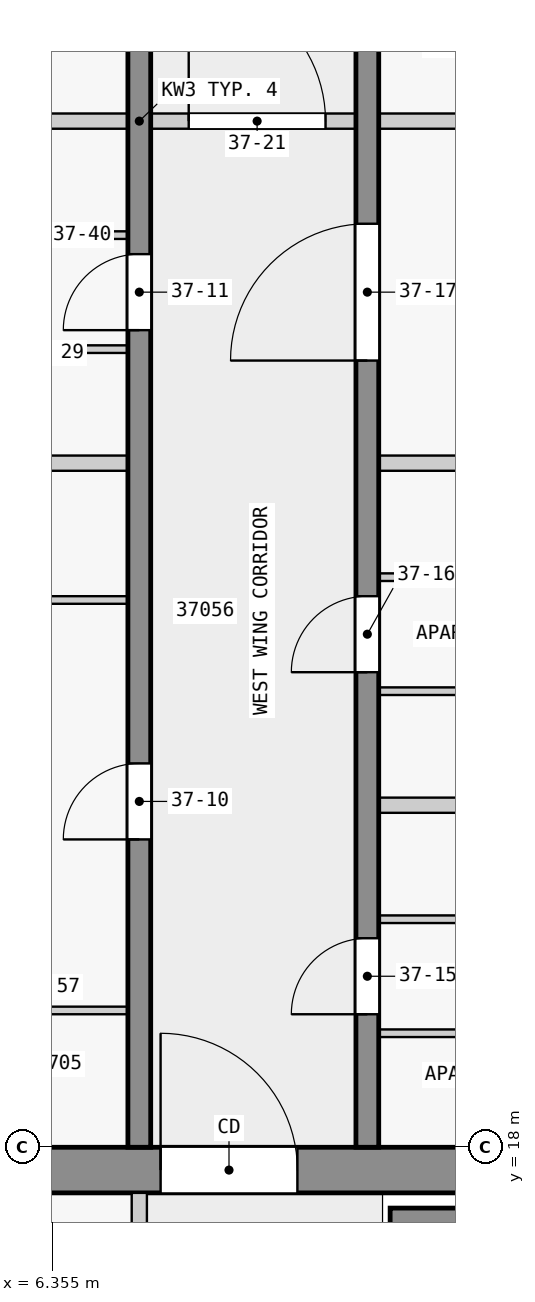
"""IFC4 building model, lengths in metres.
Left out: names, types, materials, properties, quantities, classifications, styles, units other than length and angle.
Written with IfcOpenShell. Run it as: python <this file> out.ifc"""

import sys

from ifc_helpers import new_model, si_unit, direction, frame, frame_2d, origin, place, context, subcontext, project, spatial, rectangle, extrude, element, fill, save


model = new_model("IFC4")
c1 = context("Model", 3, precision=1e-05, world=origin(), true_north=direction((0.0, 1.0)))
c2 = subcontext(c1, "Body", "Model", "MODEL_VIEW")
j1 = project(units=[si_unit("LENGTHUNIT", "METRE"), si_unit("PLANEANGLEUNIT", "RADIAN")], contexts=[c1])
p1 = place(None, origin())
s1 = spatial("IfcSite", under=j1, at=p1, CompositionType="ELEMENT")
p2 = place(p1, origin())
s2 = spatial("IfcBuilding", under=s1, at=p2, CompositionType="ELEMENT")
p3 = place(p2, frame((0.0, 0.0, 146.4)))
s3 = spatial("IfcBuildingStorey", under=s2, at=p3, CompositionType="ELEMENT", Elevation=146.4)
p4 = place(p3, frame((1.38, 17.7, 0.0), z_axis=(0.0, 0.0, 1.0), x_axis=(1.0, 0.0, 0.0)))
e1 = element("IfcWall", 1, at=p4, inside=s3, PredefinedType="SHEAR", context=c2, shape_type="SweptSolid", body=[
    extrude(rectangle(XDim=21.12, YDim=0.6, at=frame_2d((10.56, 0.0))), origin(), (0.0, 0.0, 1.0), 3.25),
])
p5 = place(p4, frame((6.4, 0.0, 0.0)))
e2 = element("IfcOpeningElement", 2, at=p5, cuts=e1, PredefinedType="OPENING", context=c2, shape_type="SweptSolid", body=[
    extrude(rectangle(XDim=1.8, YDim=2.1, at=frame_2d((0.9, 1.05))), frame((0.0, 0.31, 0.0), z_axis=(0.0, -1.0, 0.0), x_axis=(1.0, 0.0, 0.0)), (0.0, 0.0, 1.0), 0.62),
])
p6 = place(p3, frame((10.8, 17.05, 0.0), z_axis=(0.0, 0.0, 1.0), x_axis=(1.0, 0.0, 0.0)))
e3 = element("IfcWall", 3, at=p6, inside=s3, PredefinedType="SHEAR", context=c2, shape_type="SweptSolid", body=[
    extrude(rectangle(XDim=7.8, YDim=0.3, at=frame_2d((3.9, 0.0))), origin(), (0.0, 0.0, 1.0), 3.25),
])
p7 = place(p3, frame((7.5, 18.0, 0.0), z_axis=(0.0, 0.0, 1.0), x_axis=(0.0, 1.0, 0.0)))
e4 = element("IfcWall", 4, at=p7, inside=s3, PredefinedType="SHEAR", context=c2, shape_type="SweptSolid", body=[
    extrude(rectangle(XDim=27.0, YDim=0.3, at=frame_2d((13.5, 0.0))), origin(), (0.0, 0.0, 1.0), 3.25),
])
p8 = place(p7, frame((4.05, 0.0, 0.0)))
e5 = element("IfcOpeningElement", 5, at=p8, cuts=e4, PredefinedType="OPENING", context=c2, shape_type="SweptSolid", body=[
    extrude(rectangle(XDim=1.0, YDim=2.1, at=frame_2d((0.5, 1.05))), frame((0.0, 0.16, 0.0), z_axis=(0.0, -1.0, 0.0), x_axis=(1.0, 0.0, 0.0)), (0.0, 0.0, 1.0), 0.32),
])
p9 = place(p7, frame((10.75, 0.0, 0.0)))
e6 = element("IfcOpeningElement", 6, at=p9, cuts=e4, PredefinedType="OPENING", context=c2, shape_type="SweptSolid", body=[
    extrude(rectangle(XDim=1.0, YDim=2.1, at=frame_2d((0.5, 1.05))), frame((0.0, 0.16, 0.0), z_axis=(0.0, -1.0, 0.0), x_axis=(1.0, 0.0, 0.0)), (0.0, 0.0, 1.0), 0.32),
])
p10 = place(p7, frame((17.55, 0.0, 0.0)))
e7 = element("IfcOpeningElement", 7, at=p10, cuts=e4, PredefinedType="OPENING", context=c2, shape_type="SweptSolid", body=[
    extrude(rectangle(XDim=1.0, YDim=2.1, at=frame_2d((0.5, 1.05))), frame((0.0, 0.16, 0.0), z_axis=(0.0, -1.0, 0.0), x_axis=(1.0, 0.0, 0.0)), (0.0, 0.0, 1.0), 0.32),
])
p11 = place(p7, frame((23.25, 0.0, 0.0)))
e8 = element("IfcOpeningElement", 8, at=p11, cuts=e4, PredefinedType="OPENING", context=c2, shape_type="SweptSolid", body=[
    extrude(rectangle(XDim=0.9, YDim=2.1, at=frame_2d((0.45, 1.05))), frame((0.0, 0.16, 0.0), z_axis=(0.0, -1.0, 0.0), x_axis=(1.0, 0.0, 0.0)), (0.0, 0.0, 1.0), 0.32),
])
p12 = place(p7, frame((25.45, 0.0, 0.0)))
e9 = element("IfcOpeningElement", 9, at=p12, cuts=e4, PredefinedType="OPENING", context=c2, shape_type="SweptSolid", body=[
    extrude(rectangle(XDim=1.0, YDim=2.1, at=frame_2d((0.5, 1.05))), frame((0.0, 0.16, 0.0), z_axis=(0.0, -1.0, 0.0), x_axis=(1.0, 0.0, 0.0)), (0.0, 0.0, 1.0), 0.32),
])
p13 = place(p3, frame((10.5, 18.0, 0.0), z_axis=(0.0, 0.0, 1.0), x_axis=(0.0, 1.0, 0.0)))
e10 = element("IfcWall", 10, at=p13, inside=s3, PredefinedType="SHEAR", context=c2, shape_type="SweptSolid", body=[
    extrude(rectangle(XDim=27.0, YDim=0.3, at=frame_2d((13.5, 0.0))), origin(), (0.0, 0.0, 1.0), 3.25),
])
p14 = place(p13, frame((1.75, 0.0, 0.0)))
e11 = element("IfcOpeningElement", 11, at=p14, cuts=e10, PredefinedType="OPENING", context=c2, shape_type="SweptSolid", body=[
    extrude(rectangle(XDim=1.0, YDim=2.1, at=frame_2d((0.5, 1.05))), frame((0.0, 0.16, 0.0), z_axis=(0.0, -1.0, 0.0), x_axis=(1.0, 0.0, 0.0)), (0.0, 0.0, 1.0), 0.32),
])
p15 = place(p13, frame((6.25, 0.0, 0.0)))
e12 = element("IfcOpeningElement", 12, at=p15, cuts=e10, PredefinedType="OPENING", context=c2, shape_type="SweptSolid", body=[
    extrude(rectangle(XDim=1.0, YDim=2.1, at=frame_2d((0.5, 1.05))), frame((0.0, 0.16, 0.0), z_axis=(0.0, -1.0, 0.0), x_axis=(1.0, 0.0, 0.0)), (0.0, 0.0, 1.0), 0.32),
])
p16 = place(p13, frame((10.35, 0.0, 0.0)))
e13 = element("IfcOpeningElement", 13, at=p16, cuts=e10, PredefinedType="OPENING", context=c2, shape_type="SweptSolid", body=[
    extrude(rectangle(XDim=1.8, YDim=2.1, at=frame_2d((0.9, 1.05))), frame((0.0, 0.16, 0.0), z_axis=(0.0, -1.0, 0.0), x_axis=(1.0, 0.0, 0.0)), (0.0, 0.0, 1.0), 0.32),
])
p17 = place(p13, frame((15.25, 0.0, 0.0)))
e14 = element("IfcOpeningElement", 14, at=p17, cuts=e10, PredefinedType="OPENING", context=c2, shape_type="SweptSolid", body=[
    extrude(rectangle(XDim=1.0, YDim=2.1, at=frame_2d((0.5, 1.05))), frame((0.0, 0.16, 0.0), z_axis=(0.0, -1.0, 0.0), x_axis=(1.0, 0.0, 0.0)), (0.0, 0.0, 1.0), 0.32),
])
p18 = place(p13, frame((21.35, 0.0, 0.0)))
e15 = element("IfcOpeningElement", 15, at=p18, cuts=e10, PredefinedType="OPENING", context=c2, shape_type="SweptSolid", body=[
    extrude(rectangle(XDim=1.0, YDim=2.1, at=frame_2d((0.5, 1.05))), frame((0.0, 0.16, 0.0), z_axis=(0.0, -1.0, 0.0), x_axis=(1.0, 0.0, 0.0)), (0.0, 0.0, 1.0), 0.32),
])
p19 = place(p3, frame((7.5, 10.1, 0.0), z_axis=(0.0, 0.0, 1.0), x_axis=(0.0, 1.0, 0.0)))
e16 = element("IfcWall", 16, at=p19, inside=s3, PredefinedType="PARTITIONING", context=c2, shape_type="SweptSolid", body=[
    extrude(rectangle(XDim=7.3, YDim=0.2, at=frame_2d((3.65, 0.0))), origin(), (0.0, 0.0, 1.0), 3.25),
])
p20 = place(p19, frame((0.75, 0.0, 0.0)))
e17 = element("IfcOpeningElement", 17, at=p20, cuts=e16, PredefinedType="OPENING", context=c2, shape_type="SweptSolid", body=[
    extrude(rectangle(XDim=0.9, YDim=2.1, at=frame_2d((0.45, 1.05))), frame((0.0, 0.11, 0.0), z_axis=(0.0, -1.0, 0.0), x_axis=(1.0, 0.0, 0.0)), (0.0, 0.0, 1.0), 0.22),
])
p21 = place(p19, frame((4.4, 0.0, 0.0)))
e18 = element("IfcOpeningElement", 18, at=p21, cuts=e16, PredefinedType="OPENING", context=c2, shape_type="SweptSolid", body=[
    extrude(rectangle(XDim=0.9, YDim=2.1, at=frame_2d((0.45, 1.05))), frame((0.0, 0.11, 0.0), z_axis=(0.0, -1.0, 0.0), x_axis=(1.0, 0.0, 0.0)), (0.0, 0.0, 1.0), 0.22),
])
p22 = place(p3, frame((14.05, 19.5, 0.0), z_axis=(0.0, 0.0, 1.0), x_axis=(-1.0, 0.0, 0.0)))
e19 = element("IfcWall", 19, at=p22, inside=s3, PredefinedType="PARTITIONING", context=c2, shape_type="SweptSolid", body=[
    extrude(rectangle(XDim=3.4, YDim=0.1, at=frame_2d((1.7, 0.0))), origin(), (0.0, 0.0, 1.0), 3.25),
])
p23 = place(p22, frame((1.25, 0.0, 0.0)))
e20 = element("IfcOpeningElement", 20, at=p23, cuts=e19, PredefinedType="OPENING", context=c2, shape_type="SweptSolid", body=[
    extrude(rectangle(XDim=0.9, YDim=2.1, at=frame_2d((0.45, 1.05))), frame((0.0, 0.06, 0.0), z_axis=(0.0, -1.0, 0.0), x_axis=(1.0, 0.0, 0.0)), (0.0, 0.0, 1.0), 0.12),
])
p24 = place(p3, frame((7.35, 19.8, 0.0), z_axis=(0.0, 0.0, 1.0), x_axis=(-1.0, 0.0, 0.0)))
e21 = element("IfcWall", 21, at=p24, inside=s3, PredefinedType="PARTITIONING", context=c2, shape_type="SweptSolid", body=[
    extrude(rectangle(XDim=3.4, YDim=0.1, at=frame_2d((1.7, 0.0))), origin(), (0.0, 0.0, 1.0), 3.25),
])
p25 = place(p24, frame((1.25, 0.0, 0.0)))
e22 = element("IfcOpeningElement", 22, at=p25, cuts=e21, PredefinedType="OPENING", context=c2, shape_type="SweptSolid", body=[
    extrude(rectangle(XDim=0.9, YDim=2.1, at=frame_2d((0.45, 1.05))), frame((0.0, 0.06, 0.0), z_axis=(0.0, -1.0, 0.0), x_axis=(1.0, 0.0, 0.0)), (0.0, 0.0, 1.0), 0.12),
])
p26 = place(p3, frame((10.65, 21.0, 0.0), z_axis=(0.0, 0.0, 1.0), x_axis=(1.0, 0.0, 0.0)))
e23 = element("IfcWall", 23, at=p26, inside=s3, PredefinedType="PARTITIONING", context=c2, shape_type="SweptSolid", body=[
    extrude(rectangle(XDim=3.4, YDim=0.1, at=frame_2d((1.7, 0.0))), origin(), (0.0, 0.0, 1.0), 3.25),
])
p27 = place(p26, frame((1.25, 0.0, 0.0)))
e24 = element("IfcOpeningElement", 24, at=p27, cuts=e23, PredefinedType="OPENING", context=c2, shape_type="SweptSolid", body=[
    extrude(rectangle(XDim=0.9, YDim=2.1, at=frame_2d((0.45, 1.05))), frame((0.0, 0.06, 0.0), z_axis=(0.0, -1.0, 0.0), x_axis=(1.0, 0.0, 0.0)), (0.0, 0.0, 1.0), 0.12),
])
p28 = place(p3, frame((13.95, 22.5, 0.0), z_axis=(0.0, 0.0, 1.0), x_axis=(-1.0, 0.0, 0.0)))
e25 = element("IfcWall", 25, at=p28, inside=s3, PredefinedType="PARTITIONING", context=c2, shape_type="SweptSolid", body=[
    extrude(rectangle(XDim=3.3, YDim=0.2, at=frame_2d((1.65, 0.0))), origin(), (0.0, 0.0, 1.0), 3.25),
])
p29 = place(p3, frame((14.05, 24.0, 0.0), z_axis=(0.0, 0.0, 1.0), x_axis=(-1.0, 0.0, 0.0)))
e26 = element("IfcWall", 26, at=p29, inside=s3, PredefinedType="PARTITIONING", context=c2, shape_type="SweptSolid", body=[
    extrude(rectangle(XDim=3.4, YDim=0.1, at=frame_2d((1.7, 0.0))), origin(), (0.0, 0.0, 1.0), 3.25),
])
p30 = place(p29, frame((1.25, 0.0, 0.0)))
e27 = element("IfcOpeningElement", 27, at=p30, cuts=e26, PredefinedType="OPENING", context=c2, shape_type="SweptSolid", body=[
    extrude(rectangle(XDim=0.9, YDim=2.1, at=frame_2d((0.45, 1.05))), frame((0.0, 0.06, 0.0), z_axis=(0.0, -1.0, 0.0), x_axis=(1.0, 0.0, 0.0)), (0.0, 0.0, 1.0), 0.12),
])
p31 = place(p3, frame((3.95, 25.2, 0.0), z_axis=(0.0, 0.0, 1.0), x_axis=(1.0, 0.0, 0.0)))
e28 = element("IfcWall", 28, at=p31, inside=s3, PredefinedType="PARTITIONING", context=c2, shape_type="SweptSolid", body=[
    extrude(rectangle(XDim=3.4, YDim=0.1, at=frame_2d((1.7, 0.0))), origin(), (0.0, 0.0, 1.0), 3.25),
])
p32 = place(p31, frame((1.25, 0.0, 0.0)))
e29 = element("IfcOpeningElement", 29, at=p32, cuts=e28, PredefinedType="OPENING", context=c2, shape_type="SweptSolid", body=[
    extrude(rectangle(XDim=0.9, YDim=2.1, at=frame_2d((0.45, 1.05))), frame((0.0, 0.06, 0.0), z_axis=(0.0, -1.0, 0.0), x_axis=(1.0, 0.0, 0.0)), (0.0, 0.0, 1.0), 0.12),
])
p33 = place(p3, frame((10.65, 25.5, 0.0), z_axis=(0.0, 0.0, 1.0), x_axis=(1.0, 0.0, 0.0)))
e30 = element("IfcWall", 30, at=p33, inside=s3, PredefinedType="PARTITIONING", context=c2, shape_type="SweptSolid", body=[
    extrude(rectangle(XDim=3.4, YDim=0.1, at=frame_2d((1.7, 0.0))), origin(), (0.0, 0.0, 1.0), 3.25),
])
p34 = place(p33, frame((1.25, 0.0, 0.0)))
e31 = element("IfcOpeningElement", 31, at=p34, cuts=e30, PredefinedType="OPENING", context=c2, shape_type="SweptSolid", body=[
    extrude(rectangle(XDim=0.9, YDim=2.1, at=frame_2d((0.45, 1.05))), frame((0.0, 0.06, 0.0), z_axis=(0.0, -1.0, 0.0), x_axis=(1.0, 0.0, 0.0)), (0.0, 0.0, 1.0), 0.12),
])
for number, where, z_axis, x_axis in (
    (32, (7.35, 27.0, 0.0), (0.0, 0.0, 1.0), (-1.0, 0.0, 0.0)),
    (33, (13.95, 27.0, 0.0), (0.0, 0.0, 1.0), (-1.0, 0.0, 0.0)),
):
    element("IfcWall", number, at=place(p3, frame(where, z_axis=z_axis, x_axis=x_axis)), inside=s3, PredefinedType="PARTITIONING", context=c2, shape_type="SweptSolid", body=[
        extrude(rectangle(XDim=3.3, YDim=0.2, at=frame_2d((1.65, 0.0))), origin(), (0.0, 0.0, 1.0), 3.25),
    ])
p35 = place(p3, frame((7.35, 28.5, 0.0), z_axis=(0.0, 0.0, 1.0), x_axis=(-1.0, 0.0, 0.0)))
e34 = element("IfcWall", 34, at=p35, inside=s3, PredefinedType="PARTITIONING", context=c2, shape_type="SweptSolid", body=[
    extrude(rectangle(XDim=3.4, YDim=0.1, at=frame_2d((1.7, 0.0))), origin(), (0.0, 0.0, 1.0), 3.25),
])
p36 = place(p35, frame((1.25, 0.0, 0.0)))
e35 = element("IfcOpeningElement", 35, at=p36, cuts=e34, PredefinedType="OPENING", context=c2, shape_type="SweptSolid", body=[
    extrude(rectangle(XDim=0.9, YDim=2.1, at=frame_2d((0.45, 1.05))), frame((0.0, 0.06, 0.0), z_axis=(0.0, -1.0, 0.0), x_axis=(1.0, 0.0, 0.0)), (0.0, 0.0, 1.0), 0.12),
])
p37 = place(p3, frame((3.95, 30.0, 0.0), z_axis=(0.0, 0.0, 1.0), x_axis=(1.0, 0.0, 0.0)))
e36 = element("IfcWall", 36, at=p37, inside=s3, PredefinedType="PARTITIONING", context=c2, shape_type="SweptSolid", body=[
    extrude(rectangle(XDim=3.4, YDim=0.1, at=frame_2d((1.7, 0.0))), origin(), (0.0, 0.0, 1.0), 3.25),
])
p38 = place(p37, frame((1.25, 0.0, 0.0)))
e37 = element("IfcOpeningElement", 37, at=p38, cuts=e36, PredefinedType="OPENING", context=c2, shape_type="SweptSolid", body=[
    extrude(rectangle(XDim=0.9, YDim=2.1, at=frame_2d((0.45, 1.05))), frame((0.0, 0.06, 0.0), z_axis=(0.0, -1.0, 0.0), x_axis=(1.0, 0.0, 0.0)), (0.0, 0.0, 1.0), 0.12),
])
p39 = place(p3, frame((7.35, 31.5, 0.0), z_axis=(0.0, 0.0, 1.0), x_axis=(-1.0, 0.0, 0.0)))
e38 = element("IfcWall", 38, at=p39, inside=s3, PredefinedType="PARTITIONING", context=c2, shape_type="SweptSolid", body=[
    extrude(rectangle(XDim=3.3, YDim=0.2, at=frame_2d((1.65, 0.0))), origin(), (0.0, 0.0, 1.0), 3.25),
])
p40 = place(p3, frame((17.85, 31.5, 0.0), z_axis=(0.0, 0.0, 1.0), x_axis=(-1.0, 0.0, 0.0)))
e39 = element("IfcWall", 39, at=p40, inside=s3, PredefinedType="PARTITIONING", context=c2, shape_type="SweptSolid", body=[
    extrude(rectangle(XDim=7.2, YDim=0.2, at=frame_2d((3.6, 0.0))), origin(), (0.0, 0.0, 1.0), 3.25),
])
p41 = place(p3, frame((7.45, 31.5, 0.0), z_axis=(0.0, 0.0, 1.0), x_axis=(1.0, 0.0, 0.0)))
e40 = element("IfcWall", 40, at=p41, inside=s3, PredefinedType="PARTITIONING", context=c2, shape_type="SweptSolid", body=[
    extrude(rectangle(XDim=3.1, YDim=0.2, at=frame_2d((1.55, 0.0))), origin(), (0.0, 0.0, 1.0), 3.25),
])
p42 = place(p41, frame((0.7, 0.0, 0.0)))
e41 = element("IfcOpeningElement", 41, at=p42, cuts=e40, PredefinedType="OPENING", context=c2, shape_type="SweptSolid", body=[
    extrude(rectangle(XDim=1.8, YDim=2.1, at=frame_2d((0.9, 1.05))), frame((0.0, 0.11, 0.0), z_axis=(0.0, -1.0, 0.0), x_axis=(1.0, 0.0, 0.0)), (0.0, 0.0, 1.0), 0.22),
])
p43 = place(p5, origin())
e42 = element("IfcDoor", 42, at=p43, inside=s3, OperationType="DOUBLE_DOOR_SINGLE_SWING", PredefinedType="DOOR", context=c2, shape_type="SweptSolid", body=[
    extrude(rectangle(XDim=1.8, YDim=2.1, at=frame_2d((0.9, 1.05))), frame((0.0, 0.025, 0.0), z_axis=(0.0, -1.0, 0.0), x_axis=(1.0, 0.0, 0.0)), (0.0, 0.0, 1.0), 0.05),
])
fill(e2, e42)
p44 = place(p8, origin())
e43 = element("IfcDoor", 43, at=p44, inside=s3, OperationType="SINGLE_SWING_LEFT", PredefinedType="DOOR", context=c2, shape_type="SweptSolid", body=[
    extrude(rectangle(XDim=1.0, YDim=2.1, at=frame_2d((0.5, 1.05))), frame((0.0, 0.025, 0.0), z_axis=(0.0, -1.0, 0.0), x_axis=(1.0, 0.0, 0.0)), (0.0, 0.0, 1.0), 0.05),
])
fill(e5, e43)
p45 = place(p9, origin())
e44 = element("IfcDoor", 44, at=p45, inside=s3, OperationType="SINGLE_SWING_LEFT", PredefinedType="DOOR", context=c2, shape_type="SweptSolid", body=[
    extrude(rectangle(XDim=1.0, YDim=2.1, at=frame_2d((0.5, 1.05))), frame((0.0, 0.025, 0.0), z_axis=(0.0, -1.0, 0.0), x_axis=(1.0, 0.0, 0.0)), (0.0, 0.0, 1.0), 0.05),
])
fill(e6, e44)
p46 = place(p14, origin())
e45 = element("IfcDoor", 45, at=p46, inside=s3, OperationType="SINGLE_SWING_LEFT", PredefinedType="DOOR", context=c2, shape_type="SweptSolid", body=[
    extrude(rectangle(XDim=1.0, YDim=2.1, at=frame_2d((0.5, 1.05))), frame((0.0, 0.025, 0.0), z_axis=(0.0, -1.0, 0.0), x_axis=(1.0, 0.0, 0.0)), (0.0, 0.0, 1.0), 0.05),
])
fill(e11, e45)
p47 = place(p15, origin())
e46 = element("IfcDoor", 46, at=p47, inside=s3, OperationType="SINGLE_SWING_LEFT", PredefinedType="DOOR", context=c2, shape_type="SweptSolid", body=[
    extrude(rectangle(XDim=1.0, YDim=2.1, at=frame_2d((0.5, 1.05))), frame((0.0, 0.025, 0.0), z_axis=(0.0, -1.0, 0.0), x_axis=(1.0, 0.0, 0.0)), (0.0, 0.0, 1.0), 0.05),
])
fill(e12, e46)
p48 = place(p16, origin())
e47 = element("IfcDoor", 47, at=p48, inside=s3, OperationType="SINGLE_SWING_LEFT", PredefinedType="DOOR", context=c2, shape_type="SweptSolid", body=[
    extrude(rectangle(XDim=1.8, YDim=2.1, at=frame_2d((0.9, 1.05))), frame((0.0, 0.025, 0.0), z_axis=(0.0, -1.0, 0.0), x_axis=(1.0, 0.0, 0.0)), (0.0, 0.0, 1.0), 0.05),
])
fill(e13, e47)
p49 = place(p42, origin())
e48 = element("IfcDoor", 48, at=p49, inside=s3, OperationType="SINGLE_SWING_RIGHT", PredefinedType="DOOR", context=c2, shape_type="SweptSolid", body=[
    extrude(rectangle(XDim=1.8, YDim=2.1, at=frame_2d((0.9, 1.05))), frame((0.0, 0.025, 0.0), z_axis=(0.0, -1.0, 0.0), x_axis=(1.0, 0.0, 0.0)), (0.0, 0.0, 1.0), 0.05),
])
fill(e41, e48)
save(model, sys.argv[1])
